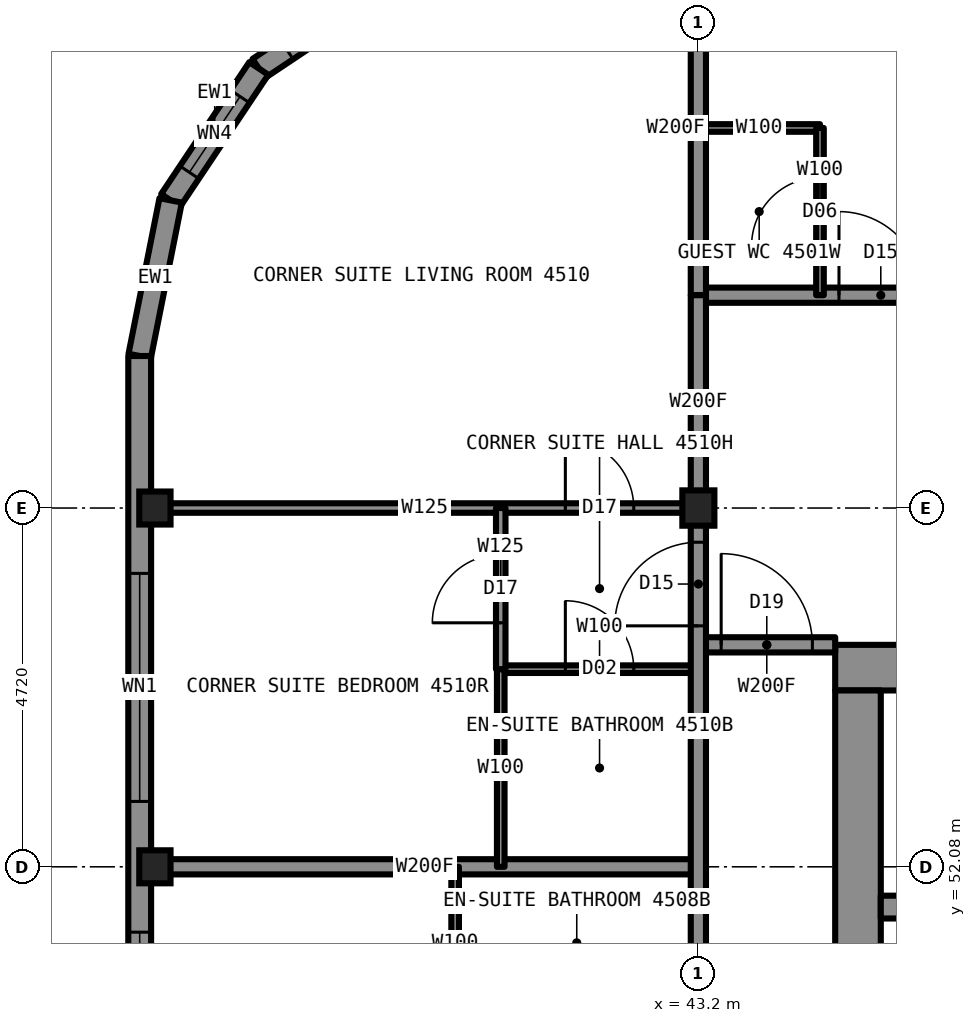
"""IFC4 building model, lengths in metres.
Left out: names, types, materials, properties, quantities, classifications, styles, units other than length and angle.
Written with IfcOpenShell. Run it as: python <this file> out.ifc"""

import sys

from ifc_helpers import new_model, si_unit, direction, frame, frame_2d, origin, origin_2d, place, context, subcontext, project, spatial, rectangle, i_section, extrude, element, fill, save


model = new_model("IFC4")
c1 = context("Model", 3, precision=1e-05, world=origin(), true_north=direction((0.0, 1.0)))
c2 = subcontext(c1, "Body", "Model", "MODEL_VIEW")
j1 = project(units=[si_unit("LENGTHUNIT", "METRE"), si_unit("PLANEANGLEUNIT", "RADIAN")], contexts=[c1])
p1 = place(None, origin())
s1 = spatial("IfcSite", under=j1, at=p1, CompositionType="ELEMENT")
p2 = place(p1, origin())
s2 = spatial("IfcBuilding", under=s1, at=p2, CompositionType="ELEMENT")
p3 = place(p2, frame((0.0, 0.0, 161.8)))
s3 = spatial("IfcBuildingStorey", under=s2, at=p3, CompositionType="ELEMENT", Elevation=161.8)
for number, where, z_axis, x_axis in (
    (1, (36.05, 52.08, 0.0), (0.0, 0.0, 1.0), (1.0, 0.0, 0.0)),
    (2, (36.05, 56.8, 0.0), (0.0, 0.0, 1.0), (1.0, 0.0, 0.0)),
):
    element("IfcColumn", number, at=place(p3, frame(where, z_axis=z_axis, x_axis=x_axis)), inside=s3, PredefinedType="COLUMN", context=c2, shape_type="SweptSolid", body=[
        extrude(i_section(OverallWidth=0.442, OverallDepth=0.531, WebThickness=0.066, FlangeThickness=0.106, at=origin_2d()), origin(), (0.0, 0.0, 1.0), 3.5),
    ])
p4 = place(p3, frame((43.2, 56.8, 0.0), z_axis=(0.0, 0.0, 1.0), x_axis=(1.0, 0.0, 0.0)))
e3 = element("IfcColumn", 3, at=p4, inside=s3, PredefinedType="COLUMN", context=c2, shape_type="SweptSolid", body=[
    extrude(i_section(OverallWidth=0.422, OverallDepth=0.465, WebThickness=0.045, FlangeThickness=0.073, at=origin_2d()), origin(), (0.0, 0.0, 1.0), 3.5),
])
p5 = place(p3, frame((45.0, 54.7, 0.0), z_axis=(0.0, 0.0, 1.0), x_axis=(1.0, 0.0, 0.0)))
e4 = element("IfcWall", 4, at=p5, inside=s3, PredefinedType="SHEAR", context=c2, shape_type="SweptSolid", body=[
    extrude(rectangle(XDim=20.0, YDim=0.6, at=frame_2d((10.0, 0.0))), origin(), (0.0, 0.0, 1.0), 3.5),
])
p6 = place(p3, frame((45.3, 35.6, 0.0), z_axis=(0.0, 0.0, 1.0), x_axis=(0.0, 1.0, 0.0)))
e5 = element("IfcWall", 5, at=p6, inside=s3, PredefinedType="SHEAR", context=c2, shape_type="SweptSolid", body=[
    extrude(rectangle(XDim=18.8, YDim=0.6, at=frame_2d((9.4, 0.0))), origin(), (0.0, 0.0, 1.0), 3.5),
])
p7 = place(p6, frame((13.4, 0.0, 0.0)))
e6 = element("IfcOpeningElement", 6, at=p7, cuts=e5, PredefinedType="OPENING", context=c2, shape_type="SweptSolid", body=[
    extrude(rectangle(XDim=1.8, YDim=2.2, at=frame_2d((0.9, 1.1))), frame((0.0, 0.31, 0.0), z_axis=(0.0, -1.0, 0.0), x_axis=(1.0, 0.0, 0.0)), (0.0, 0.0, 1.0), 0.62),
])
p8 = place(p6, frame((3.6, 0.0, 0.0)))
e7 = element("IfcOpeningElement", 7, at=p8, cuts=e5, PredefinedType="OPENING", context=c2, shape_type="SweptSolid", body=[
    extrude(rectangle(XDim=1.8, YDim=2.2, at=frame_2d((0.9, 1.1))), frame((0.0, 0.31, 0.0), z_axis=(0.0, -1.0, 0.0), x_axis=(1.0, 0.0, 0.0)), (0.0, 0.0, 1.0), 0.62),
])
p9 = place(p6, frame((6.4, 0.0, 0.0)))
e8 = element("IfcOpeningElement", 8, at=p9, cuts=e5, PredefinedType="OPENING", context=c2, shape_type="SweptSolid", body=[
    extrude(rectangle(XDim=1.2, YDim=2.2, at=frame_2d((0.6, 1.1))), frame((0.0, 0.31, 0.0), z_axis=(0.0, -1.0, 0.0), x_axis=(1.0, 0.0, 0.0)), (0.0, 0.0, 1.0), 0.62),
])
p10 = place(p3, frame((45.6, 51.55, 0.0), z_axis=(0.0, 0.0, 1.0), x_axis=(1.0, 0.0, 0.0)))
e9 = element("IfcWall", 9, at=p10, inside=s3, PredefinedType="SHEAR", context=c2, shape_type="SweptSolid", body=[
    extrude(rectangle(XDim=18.8, YDim=0.3, at=frame_2d((9.4, 0.0))), origin(), (0.0, 0.0, 1.0), 3.5),
])
p11 = place(p10, frame((4.8, 0.0, 0.0)))
e10 = element("IfcOpeningElement", 10, at=p11, cuts=e9, PredefinedType="OPENING", context=c2, shape_type="SweptSolid", body=[
    extrude(rectangle(XDim=1.0, YDim=2.1, at=frame_2d((0.5, 1.05))), frame((0.0, 0.16, 0.0), z_axis=(0.0, -1.0, 0.0), x_axis=(1.0, 0.0, 0.0)), (0.0, 0.0, 1.0), 0.32),
])
p12 = place(p10, frame((11.6, 0.0, 0.0)))
e11 = element("IfcOpeningElement", 11, at=p12, cuts=e9, PredefinedType="OPENING", context=c2, shape_type="SweptSolid", body=[
    extrude(rectangle(XDim=1.1, YDim=2.2, at=frame_2d((0.55, 1.1))), frame((0.0, 0.16, 0.0), z_axis=(0.0, -1.0, 0.0), x_axis=(1.0, 0.0, 0.0)), (0.0, 0.0, 1.0), 0.32),
])
p13 = place(p10, frame((14.3, 0.0, 0.0)))
e12 = element("IfcOpeningElement", 12, at=p13, cuts=e9, PredefinedType="OPENING", context=c2, shape_type="SweptSolid", body=[
    extrude(rectangle(XDim=1.1, YDim=2.2, at=frame_2d((0.55, 1.1))), frame((0.0, 0.16, 0.0), z_axis=(0.0, -1.0, 0.0), x_axis=(1.0, 0.0, 0.0)), (0.0, 0.0, 1.0), 0.32),
])
p14 = place(p3, frame((43.2, 55.0, 0.0), z_axis=(0.0, 0.0, 1.0), x_axis=(1.0, 0.0, 0.0)))
e13 = element("IfcWall", 13, at=p14, inside=s3, PredefinedType="PARTITIONING", context=c2, shape_type="SweptSolid", body=[
    extrude(rectangle(XDim=1.8, YDim=0.2, at=frame_2d((0.9, 0.0))), origin(), (0.0, 0.0, 1.0), 3.33),
])
p15 = place(p14, frame((0.3, 0.0, 0.0)))
e14 = element("IfcOpeningElement", 14, at=p15, cuts=e13, PredefinedType="OPENING", context=c2, shape_type="SweptSolid", body=[
    extrude(rectangle(XDim=1.2, YDim=2.2, at=frame_2d((0.6, 1.1))), frame((0.0, 0.11, 0.0), z_axis=(0.0, -1.0, 0.0), x_axis=(1.0, 0.0, 0.0)), (0.0, 0.0, 1.0), 0.22),
])
p16 = place(p3, frame((36.0, 56.8, 0.0), z_axis=(0.0, 0.0, 1.0), x_axis=(1.0, 0.0, 0.0)))
e15 = element("IfcWall", 15, at=p16, inside=s3, PredefinedType="PARTITIONING", context=c2, shape_type="SweptSolid", body=[
    extrude(rectangle(XDim=7.2, YDim=0.125, at=frame_2d((3.6, 0.0))), origin(), (0.0, 0.0, 1.0), 2.573),
])
p17 = place(p16, frame((5.45, 0.0, 0.0)))
e16 = element("IfcOpeningElement", 16, at=p17, cuts=e15, PredefinedType="OPENING", context=c2, shape_type="SweptSolid", body=[
    extrude(rectangle(XDim=0.9, YDim=2.2, at=frame_2d((0.45, 1.1))), frame((0.0, 0.073, 0.0), z_axis=(0.0, -1.0, 0.0), x_axis=(1.0, 0.0, 0.0)), (0.0, 0.0, 1.0), 0.145),
])
p18 = place(p3, frame((43.2, 59.6, 0.0), z_axis=(0.0, 0.0, 1.0), x_axis=(1.0, 0.0, 0.0)))
e17 = element("IfcWall", 17, at=p18, inside=s3, PredefinedType="PARTITIONING", context=c2, shape_type="SweptSolid", body=[
    extrude(rectangle(XDim=23.6, YDim=0.2, at=frame_2d((11.8, 0.0))), origin(), (0.0, 0.0, 1.0), 3.33),
])
p19 = place(p18, frame((1.85, 0.0, 0.0)))
e18 = element("IfcOpeningElement", 18, at=p19, cuts=e17, PredefinedType="OPENING", context=c2, shape_type="SweptSolid", body=[
    extrude(rectangle(XDim=1.1, YDim=2.2, at=frame_2d((0.55, 1.1))), frame((0.0, 0.11, 0.0), z_axis=(0.0, -1.0, 0.0), x_axis=(1.0, 0.0, 0.0)), (0.0, 0.0, 1.0), 0.22),
])
p20 = place(p18, frame((17.16, 0.0, 0.0)))
e19 = element("IfcOpeningElement", 19, at=p20, cuts=e17, PredefinedType="OPENING", context=c2, shape_type="SweptSolid", body=[
    extrude(rectangle(XDim=1.0, YDim=2.2, at=frame_2d((0.5, 1.1))), frame((0.0, 0.11, 0.0), z_axis=(0.0, -1.0, 0.0), x_axis=(1.0, 0.0, 0.0)), (0.0, 0.0, 1.0), 0.22),
])
p21 = place(p3, frame((43.2, 61.8, 0.0), z_axis=(0.0, 0.0, 1.0), x_axis=(1.0, 0.0, 0.0)))
e20 = element("IfcWall", 20, at=p21, inside=s3, PredefinedType="PARTITIONING", context=c2, shape_type="SweptSolid", body=[
    extrude(rectangle(XDim=1.6, YDim=0.1, at=frame_2d((0.8, 0.0))), origin(), (0.0, 0.0, 1.0), 3.33),
])
p22 = place(p3, frame((36.0, 52.08, 0.0), z_axis=(0.0, 0.0, 1.0), x_axis=(1.0, 0.0, 0.0)))
e21 = element("IfcWall", 21, at=p22, inside=s3, PredefinedType="PARTITIONING", context=c2, shape_type="SweptSolid", body=[
    extrude(rectangle(XDim=7.2, YDim=0.2, at=frame_2d((3.6, 0.0))), origin(), (0.0, 0.0, 1.0), 2.573),
])
p23 = place(p3, frame((40.6, 54.68, 0.0), z_axis=(0.0, 0.0, 1.0), x_axis=(1.0, 0.0, 0.0)))
e22 = element("IfcWall", 22, at=p23, inside=s3, PredefinedType="PARTITIONING", context=c2, shape_type="SweptSolid", body=[
    extrude(rectangle(XDim=2.6, YDim=0.1, at=frame_2d((1.3, 0.0))), origin(), (0.0, 0.0, 1.0), 3.33),
])
p24 = place(p23, frame((0.85, 0.0, 0.0)))
e23 = element("IfcOpeningElement", 23, at=p24, cuts=e22, PredefinedType="OPENING", context=c2, shape_type="SweptSolid", body=[
    extrude(rectangle(XDim=0.9, YDim=2.1, at=frame_2d((0.45, 1.05))), frame((0.0, 0.06, 0.0), z_axis=(0.0, -1.0, 0.0), x_axis=(1.0, 0.0, 0.0)), (0.0, 0.0, 1.0), 0.12),
])
p25 = place(p3, frame((44.8, 59.6, 0.0), z_axis=(0.0, 0.0, 1.0), x_axis=(0.0, 1.0, 0.0)))
e24 = element("IfcWall", 24, at=p25, inside=s3, PredefinedType="PARTITIONING", context=c2, shape_type="SweptSolid", body=[
    extrude(rectangle(XDim=2.2, YDim=0.1, at=frame_2d((1.1, 0.0))), origin(), (0.0, 0.0, 1.0), 3.33),
])
p26 = place(p25, frame((0.65, 0.0, 0.0)))
e25 = element("IfcOpeningElement", 25, at=p26, cuts=e24, PredefinedType="OPENING", context=c2, shape_type="SweptSolid", body=[
    extrude(rectangle(XDim=0.9, YDim=2.1, at=frame_2d((0.45, 1.05))), frame((0.0, 0.06, 0.0), z_axis=(0.0, -1.0, 0.0), x_axis=(1.0, 0.0, 0.0)), (0.0, 0.0, 1.0), 0.12),
])
p27 = place(p3, frame((43.2, 33.22, 0.0), z_axis=(0.0, 0.0, 1.0), x_axis=(0.0, 1.0, 0.0)))
e26 = element("IfcWall", 26, at=p27, inside=s3, PredefinedType="PARTITIONING", context=c2, shape_type="SweptSolid", body=[
    extrude(rectangle(XDim=23.56, YDim=0.2, at=frame_2d((11.78, 0.0))), origin(), (0.0, 0.0, 1.0), 3.33),
])
p28 = place(p27, frame((15.6, 0.0, 0.0)))
e27 = element("IfcOpeningElement", 27, at=p28, cuts=e26, PredefinedType="OPENING", context=c2, shape_type="SweptSolid", body=[
    extrude(rectangle(XDim=1.0, YDim=2.2, at=frame_2d((0.5, 1.1))), frame((0.0, 0.11, 0.0), z_axis=(0.0, -1.0, 0.0), x_axis=(1.0, 0.0, 0.0)), (0.0, 0.0, 1.0), 0.22),
])
p29 = place(p27, frame((22.03, 0.0, 0.0)))
e28 = element("IfcOpeningElement", 28, at=p29, cuts=e26, PredefinedType="OPENING", context=c2, shape_type="SweptSolid", body=[
    extrude(rectangle(XDim=1.1, YDim=2.2, at=frame_2d((0.55, 1.1))), frame((0.0, 0.11, 0.0), z_axis=(0.0, -1.0, 0.0), x_axis=(1.0, 0.0, 0.0)), (0.0, 0.0, 1.0), 0.22),
])
p30 = place(p27, frame((0.64, 0.0, 0.0)))
e29 = element("IfcOpeningElement", 29, at=p30, cuts=e26, PredefinedType="OPENING", context=c2, shape_type="SweptSolid", body=[
    extrude(rectangle(XDim=1.1, YDim=2.2, at=frame_2d((0.55, 1.1))), frame((0.0, 0.11, 0.0), z_axis=(0.0, -1.0, 0.0), x_axis=(1.0, 0.0, 0.0)), (0.0, 0.0, 1.0), 0.22),
])
p31 = place(p27, frame((7.45, 0.0, 0.0)))
e30 = element("IfcOpeningElement", 30, at=p31, cuts=e26, PredefinedType="OPENING", context=c2, shape_type="SweptSolid", body=[
    extrude(rectangle(XDim=2.0, YDim=2.4, at=frame_2d((1.0, 1.2))), frame((0.0, 0.11, 0.0), z_axis=(0.0, -1.0, 0.0), x_axis=(1.0, 0.0, 0.0)), (0.0, 0.0, 1.0), 0.22),
])
p32 = place(p27, frame((5.4, 0.0, 0.0)))
e31 = element("IfcOpeningElement", 31, at=p32, cuts=e26, PredefinedType="OPENING", context=c2, shape_type="SweptSolid", body=[
    extrude(rectangle(XDim=1.0, YDim=2.1, at=frame_2d((0.5, 1.05))), frame((0.0, 0.11, 0.0), z_axis=(0.0, -1.0, 0.0), x_axis=(1.0, 0.0, 0.0)), (0.0, 0.0, 1.0), 0.22),
])
p33 = place(p3, frame((43.2, 59.6, 0.0), z_axis=(0.0, 0.0, 1.0), x_axis=(0.0, 1.0, 0.0)))
e32 = element("IfcWall", 32, at=p33, inside=s3, PredefinedType="PARTITIONING", context=c2, shape_type="SweptSolid", body=[
    extrude(rectangle(XDim=4.4, YDim=0.2, at=frame_2d((2.2, 0.0))), origin(), (0.0, 0.0, 1.0), 2.573),
])
p34 = place(p3, frame((40.6, 52.08, 0.0), z_axis=(0.0, 0.0, 1.0), x_axis=(0.0, 1.0, 0.0)))
e33 = element("IfcWall", 33, at=p34, inside=s3, PredefinedType="PARTITIONING", context=c2, shape_type="SweptSolid", body=[
    extrude(rectangle(XDim=2.6, YDim=0.1, at=frame_2d((1.3, 0.0))), origin(), (0.0, 0.0, 1.0), 3.33),
])
p35 = place(p3, frame((40.6, 54.68, 0.0), z_axis=(0.0, 0.0, 1.0), x_axis=(0.0, 1.0, 0.0)))
e34 = element("IfcWall", 34, at=p35, inside=s3, PredefinedType="PARTITIONING", context=c2, shape_type="SweptSolid", body=[
    extrude(rectangle(XDim=2.12, YDim=0.125, at=frame_2d((1.06, 0.0))), origin(), (0.0, 0.0, 1.0), 3.33),
])
p36 = place(p35, frame((0.61, 0.0, 0.0)))
e35 = element("IfcOpeningElement", 35, at=p36, cuts=e34, PredefinedType="OPENING", context=c2, shape_type="SweptSolid", body=[
    extrude(rectangle(XDim=0.9, YDim=2.2, at=frame_2d((0.45, 1.1))), frame((0.0, 0.073, 0.0), z_axis=(0.0, -1.0, 0.0), x_axis=(1.0, 0.0, 0.0)), (0.0, 0.0, 1.0), 0.145),
])
p37 = place(p3, frame((40.0, 50.08, 0.0), z_axis=(0.0, 0.0, 1.0), x_axis=(0.0, 1.0, 0.0)))
e36 = element("IfcWall", 36, at=p37, inside=s3, PredefinedType="PARTITIONING", context=c2, shape_type="SweptSolid", body=[
    extrude(rectangle(XDim=2.0, YDim=0.1, at=frame_2d((1.0, 0.0))), origin(), (0.0, 0.0, 1.0), 3.33),
])
p38 = place(p3, frame((39.153, 63.743, 0.0), z_axis=(0.0, 0.0, 1.0), x_axis=(-0.831474039234, -0.555563607591, 0.0)))
e37 = element("IfcWall", 37, at=p38, inside=s3, PredefinedType="SOLIDWALL", context=c2, shape_type="SweptSolid", body=[
    extrude(rectangle(XDim=2.087, YDim=0.3, at=frame_2d((1.044, 0.0))), origin(), (0.0, 0.0, 1.0), 3.33),
])
p39 = place(p38, frame((0.444, 0.0, 0.3)))
e38 = element("IfcOpeningElement", 38, at=p39, cuts=e37, PredefinedType="OPENING", context=c2, shape_type="SweptSolid", body=[
    extrude(rectangle(XDim=1.2, YDim=1.3, at=frame_2d((0.6, 0.65))), frame((0.0, 0.16, 0.0), z_axis=(0.0, -1.0, 0.0), x_axis=(1.0, 0.0, 0.0)), (0.0, 0.0, 1.0), 0.32),
])
p40 = place(p3, frame((37.417, 62.583, 0.0), z_axis=(0.0, 0.0, 1.0), x_axis=(-0.555563607591, -0.831474039234, 0.0)))
e39 = element("IfcWall", 39, at=p40, inside=s3, PredefinedType="SOLIDWALL", context=c2, shape_type="SweptSolid", body=[
    extrude(rectangle(XDim=2.087, YDim=0.3, at=frame_2d((1.044, 0.0))), origin(), (0.0, 0.0, 1.0), 3.33),
])
p41 = place(p40, frame((0.444, 0.0, 0.3)))
e40 = element("IfcOpeningElement", 40, at=p41, cuts=e39, PredefinedType="OPENING", context=c2, shape_type="SweptSolid", body=[
    extrude(rectangle(XDim=1.2, YDim=1.3, at=frame_2d((0.6, 0.65))), frame((0.0, 0.16, 0.0), z_axis=(0.0, -1.0, 0.0), x_axis=(1.0, 0.0, 0.0)), (0.0, 0.0, 1.0), 0.32),
])
p42 = place(p3, frame((36.257, 60.847, 0.0), z_axis=(0.0, 0.0, 1.0), x_axis=(-0.195081421501, -0.980787050784, 0.0)))
e41 = element("IfcWall", 41, at=p42, inside=s3, PredefinedType="SOLIDWALL", context=c2, shape_type="SweptSolid", body=[
    extrude(rectangle(XDim=2.087, YDim=0.3, at=frame_2d((1.044, 0.0))), origin(), (0.0, 0.0, 1.0), 3.33),
])
p43 = place(p42, frame((0.444, 0.0, 0.3)))
e42 = element("IfcOpeningElement", 42, at=p43, cuts=e41, PredefinedType="OPENING", context=c2, shape_type="SweptSolid", body=[
    extrude(rectangle(XDim=1.2, YDim=2.0, at=frame_2d((0.6, 1.0))), frame((0.0, 0.16, 0.0), z_axis=(0.0, -1.0, 0.0), x_axis=(1.0, 0.0, 0.0)), (0.0, 0.0, 1.0), 0.32),
])
p44 = place(p3, frame((35.85, 58.8, 0.0), z_axis=(0.0, 0.0, 1.0), x_axis=(0.0, -1.0, 0.0)))
e43 = element("IfcWall", 43, at=p44, inside=s3, PredefinedType="SOLIDWALL", context=c2, shape_type="SweptSolid", body=[
    extrude(rectangle(XDim=27.6, YDim=0.3, at=frame_2d((13.8, 0.0))), origin(), (0.0, 0.0, 1.0), 2.83),
])
p45 = place(p44, frame((2.86, 0.0, 0.3)))
e44 = element("IfcOpeningElement", 44, at=p45, cuts=e43, PredefinedType="OPENING", context=c2, shape_type="SweptSolid", body=[
    extrude(rectangle(XDim=3.0, YDim=2.0, at=frame_2d((1.5, 1.0))), frame((0.0, 0.16, 0.0), z_axis=(0.0, -1.0, 0.0), x_axis=(1.0, 0.0, 0.0)), (0.0, 0.0, 1.0), 0.32),
])
p46 = place(p44, frame((7.58, 0.0, 0.3)))
e45 = element("IfcOpeningElement", 45, at=p46, cuts=e43, PredefinedType="OPENING", context=c2, shape_type="SweptSolid", body=[
    extrude(rectangle(XDim=3.0, YDim=2.0, at=frame_2d((1.5, 1.0))), frame((0.0, 0.16, 0.0), z_axis=(0.0, -1.0, 0.0), x_axis=(1.0, 0.0, 0.0)), (0.0, 0.0, 1.0), 0.32),
])
p47 = place(p44, frame((12.3, 0.0, 0.3)))
e46 = element("IfcOpeningElement", 46, at=p47, cuts=e43, PredefinedType="OPENING", context=c2, shape_type="SweptSolid", body=[
    extrude(rectangle(XDim=3.0, YDim=2.0, at=frame_2d((1.5, 1.0))), frame((0.0, 0.16, 0.0), z_axis=(0.0, -1.0, 0.0), x_axis=(1.0, 0.0, 0.0)), (0.0, 0.0, 1.0), 0.32),
])
p48 = place(p44, frame((17.02, 0.0, 0.3)))
e47 = element("IfcOpeningElement", 47, at=p48, cuts=e43, PredefinedType="OPENING", context=c2, shape_type="SweptSolid", body=[
    extrude(rectangle(XDim=3.0, YDim=2.0, at=frame_2d((1.5, 1.0))), frame((0.0, 0.16, 0.0), z_axis=(0.0, -1.0, 0.0), x_axis=(1.0, 0.0, 0.0)), (0.0, 0.0, 1.0), 0.32),
])
p49 = place(p44, frame((21.74, 0.0, 0.3)))
e48 = element("IfcOpeningElement", 48, at=p49, cuts=e43, PredefinedType="OPENING", context=c2, shape_type="SweptSolid", body=[
    extrude(rectangle(XDim=3.0, YDim=2.0, at=frame_2d((1.5, 1.0))), frame((0.0, 0.16, 0.0), z_axis=(0.0, -1.0, 0.0), x_axis=(1.0, 0.0, 0.0)), (0.0, 0.0, 1.0), 0.32),
])
p50 = place(p3, frame((43.2, 56.78, 0.0), z_axis=(0.0, 0.0, 1.0), x_axis=(0.0, 1.0, 0.0)))
e49 = element("IfcWall", 49, at=p50, inside=s3, PredefinedType="PARTITIONING", context=c2, shape_type="SweptSolid", body=[
    extrude(rectangle(XDim=2.82, YDim=0.2, at=frame_2d((1.41, 0.0))), origin(), (0.0, 0.0, 1.0), 2.573),
])
p51 = place(p15, origin())
e50 = element("IfcDoor", 50, at=p51, inside=s3, OperationType="SINGLE_SWING_LEFT", PredefinedType="DOOR", context=c2, shape_type="SweptSolid", body=[
    extrude(rectangle(XDim=1.2, YDim=2.2, at=frame_2d((0.6, 1.1))), frame((0.0, 0.025, 0.0), z_axis=(0.0, -1.0, 0.0), x_axis=(1.0, 0.0, 0.0)), (0.0, 0.0, 1.0), 0.05),
])
fill(e14, e50)
p52 = place(p19, origin())
e51 = element("IfcDoor", 51, at=p52, inside=s3, OperationType="SINGLE_SWING_LEFT", PredefinedType="DOOR", context=c2, shape_type="SweptSolid", body=[
    extrude(rectangle(XDim=1.1, YDim=2.2, at=frame_2d((0.55, 1.1))), frame((0.0, 0.025, 0.0), z_axis=(0.0, -1.0, 0.0), x_axis=(1.0, 0.0, 0.0)), (0.0, 0.0, 1.0), 0.05),
])
fill(e18, e51)
p53 = place(p26, origin())
e52 = element("IfcDoor", 52, at=p53, inside=s3, OperationType="SINGLE_SWING_LEFT", PredefinedType="DOOR", context=c2, shape_type="SweptSolid", body=[
    extrude(rectangle(XDim=0.9, YDim=2.1, at=frame_2d((0.45, 1.05))), frame((0.0, 0.025, 0.0), z_axis=(0.0, -1.0, 0.0), x_axis=(1.0, 0.0, 0.0)), (0.0, 0.0, 1.0), 0.05),
])
fill(e25, e52)
p54 = place(p17, origin())
e53 = element("IfcDoor", 53, at=p54, inside=s3, OperationType="SINGLE_SWING_LEFT", PredefinedType="DOOR", context=c2, shape_type="SweptSolid", body=[
    extrude(rectangle(XDim=0.9, YDim=2.2, at=frame_2d((0.45, 1.1))), frame((0.0, 0.025, 0.0), z_axis=(0.0, -1.0, 0.0), x_axis=(1.0, 0.0, 0.0)), (0.0, 0.0, 1.0), 0.05),
])
fill(e16, e53)
p55 = place(p24, origin())
e54 = element("IfcDoor", 54, at=p55, inside=s3, OperationType="SINGLE_SWING_RIGHT", PredefinedType="DOOR", context=c2, shape_type="SweptSolid", body=[
    extrude(rectangle(XDim=0.9, YDim=2.1, at=frame_2d((0.45, 1.05))), frame((0.0, 0.025, 0.0), z_axis=(0.0, -1.0, 0.0), x_axis=(1.0, 0.0, 0.0)), (0.0, 0.0, 1.0), 0.05),
])
fill(e23, e54)
p56 = place(p29, origin())
e55 = element("IfcDoor", 55, at=p56, inside=s3, OperationType="SINGLE_SWING_LEFT", PredefinedType="DOOR", context=c2, shape_type="SweptSolid", body=[
    extrude(rectangle(XDim=1.1, YDim=2.2, at=frame_2d((0.55, 1.1))), frame((0.0, 0.025, 0.0), z_axis=(0.0, -1.0, 0.0), x_axis=(1.0, 0.0, 0.0)), (0.0, 0.0, 1.0), 0.05),
])
fill(e28, e55)
p57 = place(p36, origin())
e56 = element("IfcDoor", 56, at=p57, inside=s3, OperationType="SINGLE_SWING_LEFT", PredefinedType="DOOR", context=c2, shape_type="SweptSolid", body=[
    extrude(rectangle(XDim=0.9, YDim=2.2, at=frame_2d((0.45, 1.1))), frame((0.0, 0.025, 0.0), z_axis=(0.0, -1.0, 0.0), x_axis=(1.0, 0.0, 0.0)), (0.0, 0.0, 1.0), 0.05),
])
fill(e35, e56)
p58 = place(p39, origin())
e57 = element("IfcWindow", 57, at=p58, inside=s3, PartitioningType="SINGLE_PANEL", PredefinedType="WINDOW", context=c2, shape_type="SweptSolid", body=[
    extrude(rectangle(XDim=1.2, YDim=1.3, at=frame_2d((0.6, 0.65))), frame((0.0, 0.13, 0.0), z_axis=(0.0, -1.0, 0.0), x_axis=(1.0, 0.0, 0.0)), (0.0, 0.0, 1.0), 0.06),
])
fill(e38, e57)
p59 = place(p41, origin())
e58 = element("IfcWindow", 58, at=p59, inside=s3, PartitioningType="SINGLE_PANEL", PredefinedType="WINDOW", context=c2, shape_type="SweptSolid", body=[
    extrude(rectangle(XDim=1.2, YDim=1.3, at=frame_2d((0.6, 0.65))), frame((0.0, 0.13, 0.0), z_axis=(0.0, -1.0, 0.0), x_axis=(1.0, 0.0, 0.0)), (0.0, 0.0, 1.0), 0.06),
])
fill(e40, e58)
p60 = place(p43, origin())
e59 = element("IfcWindow", 59, at=p60, inside=s3, PartitioningType="SINGLE_PANEL", PredefinedType="WINDOW", context=c2, shape_type="SweptSolid", body=[
    extrude(rectangle(XDim=1.2, YDim=2.0, at=frame_2d((0.6, 1.0))), frame((0.0, 0.13, 0.0), z_axis=(0.0, -1.0, 0.0), x_axis=(1.0, 0.0, 0.0)), (0.0, 0.0, 1.0), 0.06),
])
fill(e42, e59)
p61 = place(p45, origin())
e60 = element("IfcWindow", 60, at=p61, inside=s3, PartitioningType="SINGLE_PANEL", PredefinedType="WINDOW", context=c2, shape_type="SweptSolid", body=[
    extrude(rectangle(XDim=3.0, YDim=2.0, at=frame_2d((1.5, 1.0))), frame((0.0, 0.13, 0.0), z_axis=(0.0, -1.0, 0.0), x_axis=(1.0, 0.0, 0.0)), (0.0, 0.0, 1.0), 0.06),
])
fill(e44, e60)
p62 = place(p46, origin())
e61 = element("IfcWindow", 61, at=p62, inside=s3, PartitioningType="SINGLE_PANEL", PredefinedType="WINDOW", context=c2, shape_type="SweptSolid", body=[
    extrude(rectangle(XDim=3.0, YDim=2.0, at=frame_2d((1.5, 1.0))), frame((0.0, 0.13, 0.0), z_axis=(0.0, -1.0, 0.0), x_axis=(1.0, 0.0, 0.0)), (0.0, 0.0, 1.0), 0.06),
])
fill(e45, e61)
save(model, sys.argv[1])
